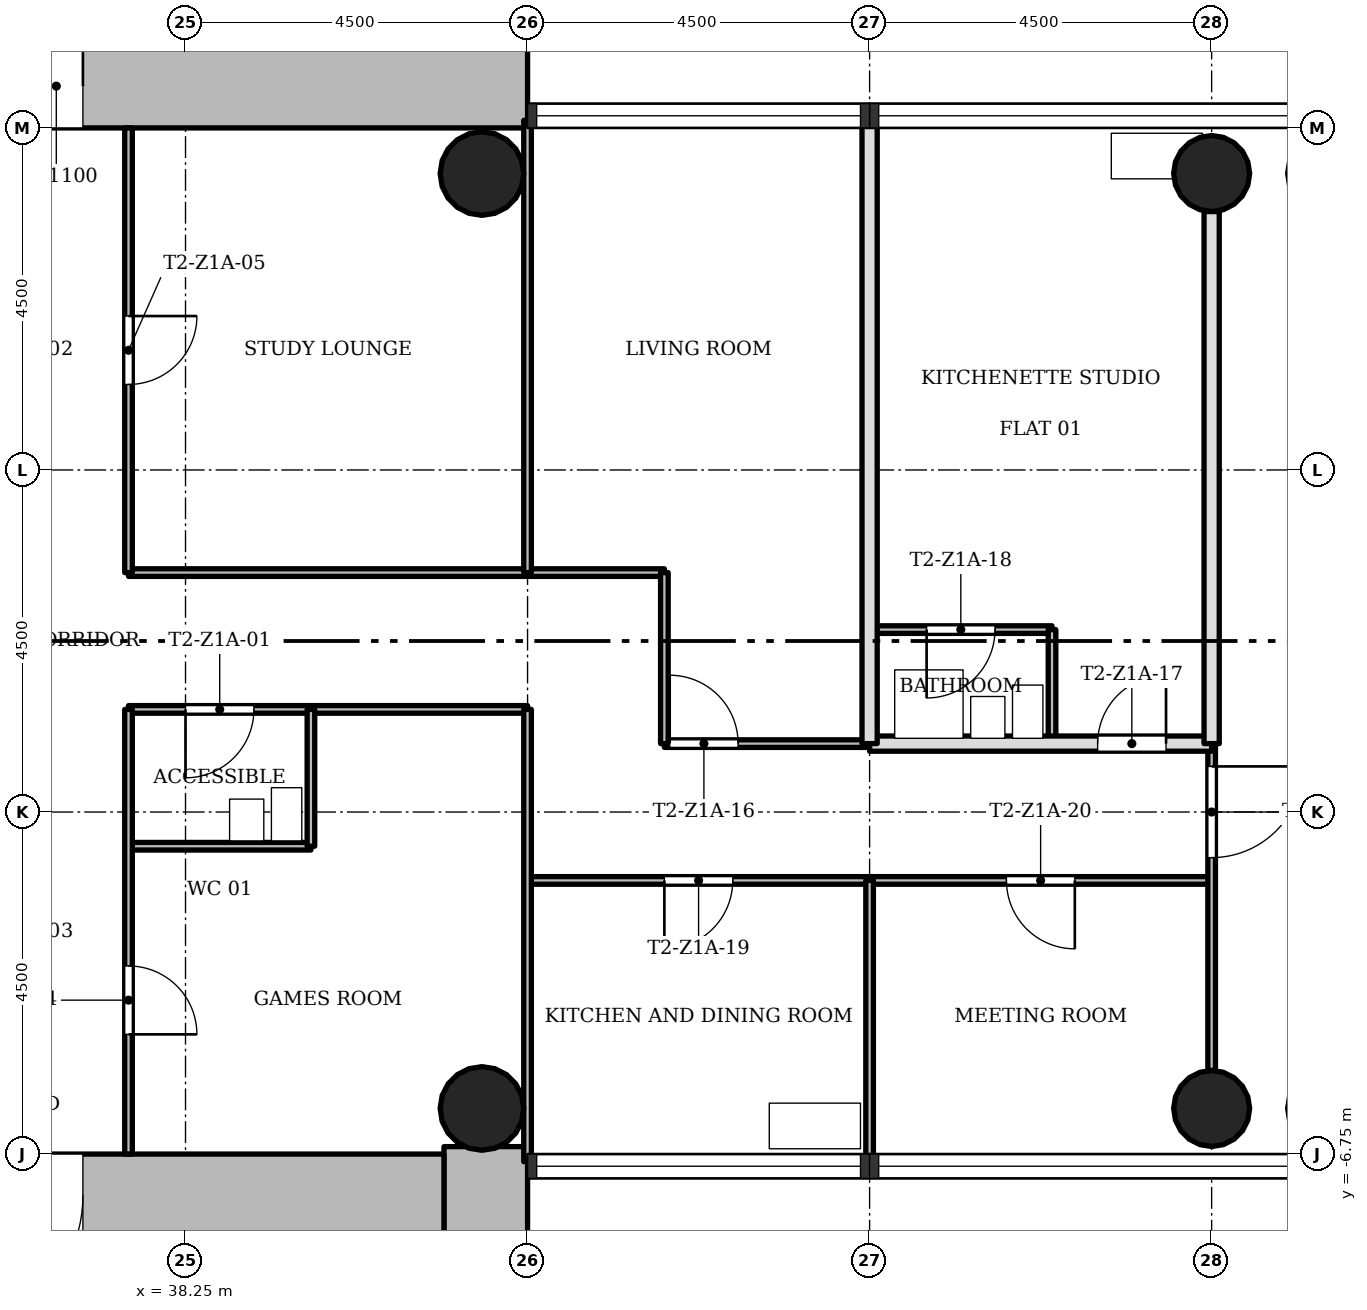
"""IFC4 building model, lengths in metres.
Left out: names, types, materials, properties, quantities, classifications, styles, units other than length and angle.
Written with IfcOpenShell. Run it as: python <this file> out.ifc"""

import sys

from ifc_helpers import new_model, si_unit, direction, frame, frame_2d, origin, origin_2d, place, context, subcontext, project, spatial, rectangle, hollow_circle, extrude, element, fill, save


model = new_model("IFC4")
c1 = context("Model", 3, precision=1e-05, world=origin(), true_north=direction((0.0, 1.0)))
c2 = subcontext(c1, "Body", "Model", "MODEL_VIEW")
j1 = project(units=[si_unit("LENGTHUNIT", "METRE"), si_unit("PLANEANGLEUNIT", "RADIAN")], contexts=[c1])
p1 = place(None, origin())
s1 = spatial("IfcSite", under=j1, at=p1, CompositionType="ELEMENT")
p2 = place(p1, origin())
s2 = spatial("IfcBuilding", under=s1, at=p2, CompositionType="ELEMENT")
p3 = place(p2, frame((0.0, 0.0, 24.5)))
s3 = spatial("IfcBuildingStorey", under=s2, at=p3, CompositionType="ELEMENT", Elevation=24.5)
p4 = place(p3, frame((30.35, 7.3, 0.0), z_axis=(0.0, 0.0, 1.0), x_axis=(1.0, 0.0, 0.0)))
e1 = element("IfcWall", 1, at=p4, inside=s3, PredefinedType="SHEAR", context=c2, shape_type="SweptSolid", body=[
    extrude(rectangle(XDim=12.4, YDim=1.1, at=frame_2d((6.2, 0.0))), origin(), (0.0, 0.0, 1.0), 3.4),
])
p5 = place(p4, frame((4.75, 0.0, 0.0)))
e2 = element("IfcOpeningElement", 2, at=p5, cuts=e1, PredefinedType="OPENING", context=c2, shape_type="SweptSolid", body=[
    extrude(rectangle(XDim=1.8, YDim=2.1, at=frame_2d((0.9, 1.05))), frame((0.0, 0.56, 0.0), z_axis=(0.0, -1.0, 0.0), x_axis=(1.0, 0.0, 0.0)), (0.0, 0.0, 1.0), 1.12),
])
p6 = place(p3, frame((42.2, -15.248, 0.0), z_axis=(0.0, 0.0, 1.0), x_axis=(0.0, 1.0, 0.0)))
e3 = element("IfcWall", 3, at=p6, inside=s3, PredefinedType="SHEAR", context=c2, shape_type="SweptSolid", body=[
    extrude(rectangle(XDim=8.596, YDim=1.1, at=frame_2d((4.298, 0.0))), origin(), (0.0, 0.0, 1.0), 3.4),
])
p7 = place(p3, frame((41.65, -7.3, 0.0), z_axis=(0.0, 0.0, 1.0), x_axis=(-1.0, 0.0, 0.0)))
e4 = element("IfcWall", 4, at=p7, inside=s3, PredefinedType="SHEAR", context=c2, shape_type="SweptSolid", body=[
    extrude(rectangle(XDim=12.4, YDim=1.1, at=frame_2d((6.2, 0.0))), origin(), (0.0, 0.0, 1.0), 3.4),
])
p8 = place(p7, frame((4.75, 0.0, 0.0)))
e5 = element("IfcOpeningElement", 5, at=p8, cuts=e4, PredefinedType="OPENING", context=c2, shape_type="SweptSolid", body=[
    extrude(rectangle(XDim=1.8, YDim=2.1, at=frame_2d((0.9, 1.05))), frame((0.0, 0.56, 0.0), z_axis=(0.0, -1.0, 0.0), x_axis=(1.0, 0.0, 0.0)), (0.0, 0.0, 1.0), 1.12),
])
for number, where, z_axis, x_axis in (
    (6, (51.75, -6.15, 0.0), (0.0, 0.0, 1.0), (1.0, 0.0, 0.0)),
    (7, (51.75, 6.15, 0.0), (0.0, 0.0, 1.0), (1.0, 0.0, 0.0)),
):
    element("IfcColumn", number, at=place(p3, frame(where, z_axis=z_axis, x_axis=x_axis)), inside=s3, PredefinedType="COLUMN", context=c2, shape_type="SweptSolid", body=[
        extrude(hollow_circle(Radius=0.5, WallThickness=0.036, at=origin_2d()), origin(), (0.0, 0.0, 1.0), 3.4),
    ])
for number, where, z_axis, x_axis in (
    (8, (42.15, -6.15, 0.0), (0.0, 0.0, 1.0), (1.0, 0.0, 0.0)),
    (9, (42.15, 6.15, 0.0), (0.0, 0.0, 1.0), (1.0, 0.0, 0.0)),
):
    element("IfcColumn", number, at=place(p3, frame(where, z_axis=z_axis, x_axis=x_axis)), inside=s3, PredefinedType="COLUMN", context=c2, shape_type="SweptSolid", body=[
        extrude(hollow_circle(Radius=0.55, WallThickness=0.04, at=origin_2d()), origin(), (0.0, 0.0, 1.0), 3.4),
    ])
p9 = place(p3, frame((51.75, -3.15, 0.0), z_axis=(0.0, 0.0, 1.0), x_axis=(-1.0, 0.0, 0.0)))
e10 = element("IfcWall", 10, at=p9, inside=s3, PredefinedType="PARTITIONING", context=c2, shape_type="SweptSolid", body=[
    extrude(rectangle(XDim=9.0, YDim=0.1, at=frame_2d((4.5, 0.0))), origin(), (0.0, 0.0, 1.0), 3.0),
])
p10 = place(p9, frame((6.3, 0.0, 0.0)))
e11 = element("IfcOpeningElement", 11, at=p10, cuts=e10, PredefinedType="OPENING", context=c2, shape_type="SweptSolid", body=[
    extrude(rectangle(XDim=0.9, YDim=2.1, at=frame_2d((0.45, 1.05))), frame((0.0, 0.06, 0.0), z_axis=(0.0, -1.0, 0.0), x_axis=(1.0, 0.0, 0.0)), (0.0, 0.0, 1.0), 0.12),
])
p11 = place(p9, frame((1.8, 0.0, 0.0)))
e12 = element("IfcOpeningElement", 12, at=p11, cuts=e10, PredefinedType="OPENING", context=c2, shape_type="SweptSolid", body=[
    extrude(rectangle(XDim=0.9, YDim=2.1, at=frame_2d((0.45, 1.05))), frame((0.0, 0.06, 0.0), z_axis=(0.0, -1.0, 0.0), x_axis=(1.0, 0.0, 0.0)), (0.0, 0.0, 1.0), 0.12),
])
p12 = place(p3, frame((39.9, -2.7, 0.0), z_axis=(0.0, 0.0, 1.0), x_axis=(-1.0, 0.0, 0.0)))
e13 = element("IfcWall", 13, at=p12, inside=s3, PredefinedType="PARTITIONING", context=c2, shape_type="SweptSolid", body=[
    extrude(rectangle(XDim=2.4, YDim=0.1, at=frame_2d((1.2, 0.0))), origin(), (0.0, 0.0, 1.0), 3.0),
])
p13 = place(p3, frame((47.25, -1.35, 0.0), z_axis=(0.0, 0.0, 1.0), x_axis=(-1.0, 0.0, 0.0)))
e14 = element("IfcWall", 14, at=p13, inside=s3, PredefinedType="PARTITIONING", context=c2, shape_type="SweptSolid", body=[
    extrude(rectangle(XDim=2.7, YDim=0.1, at=frame_2d((1.35, 0.0))), origin(), (0.0, 0.0, 1.0), 3.0),
])
p14 = place(p13, frame((1.73, 0.0, 0.0)))
e15 = element("IfcOpeningElement", 15, at=p14, cuts=e14, PredefinedType="OPENING", context=c2, shape_type="SweptSolid", body=[
    extrude(rectangle(XDim=0.9, YDim=2.1, at=frame_2d((0.45, 1.05))), frame((0.0, 0.06, 0.0), z_axis=(0.0, -1.0, 0.0), x_axis=(1.0, 0.0, 0.0)), (0.0, 0.0, 1.0), 0.12),
])
p15 = place(p3, frame((51.75, -1.35, 0.0), z_axis=(0.0, 0.0, 1.0), x_axis=(-1.0, 0.0, 0.0)))
e16 = element("IfcWall", 16, at=p15, inside=s3, PredefinedType="SOLIDWALL", context=c2, shape_type="SweptSolid", body=[
    extrude(rectangle(XDim=4.5, YDim=0.2, at=frame_2d((2.25, 0.0))), origin(), (0.0, 0.0, 1.0), 3.0),
])
p16 = place(p15, frame((0.6, 0.0, 0.0)))
e17 = element("IfcOpeningElement", 17, at=p16, cuts=e16, PredefinedType="OPENING", context=c2, shape_type="SweptSolid", body=[
    extrude(rectangle(XDim=0.9, YDim=2.1, at=frame_2d((0.45, 1.05))), frame((0.0, 0.11, 0.0), z_axis=(0.0, -1.0, 0.0), x_axis=(1.0, 0.0, 0.0)), (0.0, 0.0, 1.0), 0.22),
])
p17 = place(p3, frame((42.75, -0.9, 0.0), z_axis=(0.0, 0.0, 1.0), x_axis=(-1.0, 0.0, 0.0)))
e18 = element("IfcWall", 18, at=p17, inside=s3, PredefinedType="PARTITIONING", context=c2, shape_type="SweptSolid", body=[
    extrude(rectangle(XDim=5.25, YDim=0.1, at=frame_2d((2.625, 0.0))), origin(), (0.0, 0.0, 1.0), 3.0),
])
p18 = place(p17, frame((3.6, 0.0, 0.0)))
e19 = element("IfcOpeningElement", 19, at=p18, cuts=e18, PredefinedType="OPENING", context=c2, shape_type="SweptSolid", body=[
    extrude(rectangle(XDim=0.9, YDim=2.1, at=frame_2d((0.45, 1.05))), frame((0.0, 0.06, 0.0), z_axis=(0.0, -1.0, 0.0), x_axis=(1.0, 0.0, 0.0)), (0.0, 0.0, 1.0), 0.12),
])
p19 = place(p3, frame((49.65, 0.15, 0.0), z_axis=(0.0, 0.0, 1.0), x_axis=(-1.0, 0.0, 0.0)))
e20 = element("IfcWall", 20, at=p19, inside=s3, PredefinedType="PARTITIONING", context=c2, shape_type="SweptSolid", body=[
    extrude(rectangle(XDim=2.4, YDim=0.1, at=frame_2d((1.2, 0.0))), origin(), (0.0, 0.0, 1.0), 3.0),
])
p20 = place(p19, frame((0.75, 0.0, 0.0)))
e21 = element("IfcOpeningElement", 21, at=p20, cuts=e20, PredefinedType="OPENING", context=c2, shape_type="SweptSolid", body=[
    extrude(rectangle(XDim=0.9, YDim=2.1, at=frame_2d((0.45, 1.05))), frame((0.0, 0.06, 0.0), z_axis=(0.0, -1.0, 0.0), x_axis=(1.0, 0.0, 0.0)), (0.0, 0.0, 1.0), 0.12),
])
p21 = place(p3, frame((44.55, 0.9, 0.0), z_axis=(0.0, 0.0, 1.0), x_axis=(-1.0, 0.0, 0.0)))
e22 = element("IfcWall", 22, at=p21, inside=s3, PredefinedType="PARTITIONING", context=c2, shape_type="SweptSolid", body=[
    extrude(rectangle(XDim=7.05, YDim=0.1, at=frame_2d((3.525, 0.0))), origin(), (0.0, 0.0, 1.0), 3.0),
])
p22 = place(p3, frame((51.75, -5.65, 0.0), z_axis=(0.0, 0.0, 1.0), x_axis=(0.0, 1.0, 0.0)))
e23 = element("IfcWall", 23, at=p22, inside=s3, PredefinedType="PARTITIONING", context=c2, shape_type="SweptSolid", body=[
    extrude(rectangle(XDim=4.3, YDim=0.1, at=frame_2d((2.15, 0.0))), origin(), (0.0, 0.0, 1.0), 3.0),
])
p23 = place(p22, frame((2.8, 0.0, 0.0)))
e24 = element("IfcOpeningElement", 24, at=p23, cuts=e23, PredefinedType="OPENING", context=c2, shape_type="SweptSolid", body=[
    extrude(rectangle(XDim=1.2, YDim=2.1, at=frame_2d((0.6, 1.05))), frame((0.0, 0.06, 0.0), z_axis=(0.0, -1.0, 0.0), x_axis=(1.0, 0.0, 0.0)), (0.0, 0.0, 1.0), 0.12),
])
p24 = place(p3, frame((51.75, -1.35, 0.0), z_axis=(0.0, 0.0, 1.0), x_axis=(0.0, 1.0, 0.0)))
e25 = element("IfcWall", 25, at=p24, inside=s3, PredefinedType="SOLIDWALL", context=c2, shape_type="SweptSolid", body=[
    extrude(rectangle(XDim=7.0, YDim=0.2, at=frame_2d((3.5, 0.0))), origin(), (0.0, 0.0, 1.0), 3.0),
])
p25 = place(p3, frame((49.65, -1.35, 0.0), z_axis=(0.0, 0.0, 1.0), x_axis=(0.0, 1.0, 0.0)))
e26 = element("IfcWall", 26, at=p25, inside=s3, PredefinedType="PARTITIONING", context=c2, shape_type="SweptSolid", body=[
    extrude(rectangle(XDim=1.5, YDim=0.1, at=frame_2d((0.75, 0.0))), origin(), (0.0, 0.0, 1.0), 3.0),
])
p26 = place(p3, frame((47.25, -6.85, 0.0), z_axis=(0.0, 0.0, 1.0), x_axis=(0.0, 1.0, 0.0)))
e27 = element("IfcWall", 27, at=p26, inside=s3, PredefinedType="PARTITIONING", context=c2, shape_type="SweptSolid", body=[
    extrude(rectangle(XDim=3.7, YDim=0.1, at=frame_2d((1.85, 0.0))), origin(), (0.0, 0.0, 1.0), 3.0),
])
p27 = place(p3, frame((47.25, -1.35, 0.0), z_axis=(0.0, 0.0, 1.0), x_axis=(0.0, 1.0, 0.0)))
e28 = element("IfcWall", 28, at=p27, inside=s3, PredefinedType="SOLIDWALL", context=c2, shape_type="SweptSolid", body=[
    extrude(rectangle(XDim=8.2, YDim=0.2, at=frame_2d((4.1, 0.0))), origin(), (0.0, 0.0, 1.0), 3.0),
])
p28 = place(p3, frame((44.55, -1.35, 0.0), z_axis=(0.0, 0.0, 1.0), x_axis=(0.0, 1.0, 0.0)))
e29 = element("IfcWall", 29, at=p28, inside=s3, PredefinedType="PARTITIONING", context=c2, shape_type="SweptSolid", body=[
    extrude(rectangle(XDim=2.25, YDim=0.1, at=frame_2d((1.125, 0.0))), origin(), (0.0, 0.0, 1.0), 3.0),
])
for number, where, z_axis, x_axis in (
    (30, (42.75, -6.85, 0.0), (0.0, 0.0, 1.0), (0.0, 1.0, 0.0)),
    (31, (42.75, 0.9, 0.0), (0.0, 0.0, 1.0), (0.0, 1.0, 0.0)),
):
    element("IfcWall", number, at=place(p3, frame(where, z_axis=z_axis, x_axis=x_axis)), inside=s3, PredefinedType="PARTITIONING", context=c2, shape_type="SweptSolid", body=[
        extrude(rectangle(XDim=5.95, YDim=0.1, at=frame_2d((2.975, 0.0))), origin(), (0.0, 0.0, 1.0), 3.0),
    ])
p29 = place(p3, frame((39.9, -2.7, 0.0), z_axis=(0.0, 0.0, 1.0), x_axis=(0.0, 1.0, 0.0)))
e32 = element("IfcWall", 32, at=p29, inside=s3, PredefinedType="PARTITIONING", context=c2, shape_type="SweptSolid", body=[
    extrude(rectangle(XDim=1.8, YDim=0.1, at=frame_2d((0.9, 0.0))), origin(), (0.0, 0.0, 1.0), 3.0),
])
p30 = place(p3, frame((37.5, -6.75, 0.0), z_axis=(0.0, 0.0, 1.0), x_axis=(0.0, 1.0, 0.0)))
e33 = element("IfcWall", 33, at=p30, inside=s3, PredefinedType="PARTITIONING", context=c2, shape_type="SweptSolid", body=[
    extrude(rectangle(XDim=5.85, YDim=0.1, at=frame_2d((2.925, 0.0))), origin(), (0.0, 0.0, 1.0), 3.0),
])
p31 = place(p30, frame((1.575, 0.0, 0.0)))
e34 = element("IfcOpeningElement", 34, at=p31, cuts=e33, PredefinedType="OPENING", context=c2, shape_type="SweptSolid", body=[
    extrude(rectangle(XDim=0.9, YDim=2.1, at=frame_2d((0.45, 1.05))), frame((0.0, 0.06, 0.0), z_axis=(0.0, -1.0, 0.0), x_axis=(1.0, 0.0, 0.0)), (0.0, 0.0, 1.0), 0.12),
])
p32 = place(p3, frame((37.5, 0.9, 0.0), z_axis=(0.0, 0.0, 1.0), x_axis=(0.0, 1.0, 0.0)))
e35 = element("IfcWall", 35, at=p32, inside=s3, PredefinedType="PARTITIONING", context=c2, shape_type="SweptSolid", body=[
    extrude(rectangle(XDim=5.85, YDim=0.1, at=frame_2d((2.925, 0.0))), origin(), (0.0, 0.0, 1.0), 3.0),
])
p33 = place(p32, frame((2.475, 0.0, 0.0)))
e36 = element("IfcOpeningElement", 36, at=p33, cuts=e35, PredefinedType="OPENING", context=c2, shape_type="SweptSolid", body=[
    extrude(rectangle(XDim=0.9, YDim=2.1, at=frame_2d((0.45, 1.05))), frame((0.0, 0.06, 0.0), z_axis=(0.0, -1.0, 0.0), x_axis=(1.0, 0.0, 0.0)), (0.0, 0.0, 1.0), 0.12),
])
p34 = place(p18, origin())
e37 = element("IfcDoor", 37, at=p34, inside=s3, OperationType="SINGLE_SWING_LEFT", PredefinedType="DOOR", context=c2, shape_type="SweptSolid", body=[
    extrude(rectangle(XDim=0.9, YDim=2.1, at=frame_2d((0.45, 1.05))), frame((0.0, 0.025, 0.0), z_axis=(0.0, -1.0, 0.0), x_axis=(1.0, 0.0, 0.0)), (0.0, 0.0, 1.0), 0.05),
])
fill(e19, e37)
p35 = place(p31, origin())
e38 = element("IfcDoor", 38, at=p35, inside=s3, OperationType="SINGLE_SWING_LEFT", PredefinedType="DOOR", context=c2, shape_type="SweptSolid", body=[
    extrude(rectangle(XDim=0.9, YDim=2.1, at=frame_2d((0.45, 1.05))), frame((0.0, 0.025, 0.0), z_axis=(0.0, -1.0, 0.0), x_axis=(1.0, 0.0, 0.0)), (0.0, 0.0, 1.0), 0.05),
])
fill(e34, e38)
p36 = place(p33, origin())
e39 = element("IfcDoor", 39, at=p36, inside=s3, OperationType="SINGLE_SWING_RIGHT", PredefinedType="DOOR", context=c2, shape_type="SweptSolid", body=[
    extrude(rectangle(XDim=0.9, YDim=2.1, at=frame_2d((0.45, 1.05))), frame((0.0, 0.025, 0.0), z_axis=(0.0, -1.0, 0.0), x_axis=(1.0, 0.0, 0.0)), (0.0, 0.0, 1.0), 0.05),
])
fill(e36, e39)
p37 = place(p14, origin())
e40 = element("IfcDoor", 40, at=p37, inside=s3, OperationType="SINGLE_SWING_RIGHT", PredefinedType="DOOR", context=c2, shape_type="SweptSolid", body=[
    extrude(rectangle(XDim=0.9, YDim=2.1, at=frame_2d((0.45, 1.05))), frame((0.0, 0.025, 0.0), z_axis=(0.0, -1.0, 0.0), x_axis=(1.0, 0.0, 0.0)), (0.0, 0.0, 1.0), 0.05),
])
fill(e15, e40)
p38 = place(p16, origin())
e41 = element("IfcDoor", 41, at=p38, inside=s3, OperationType="SINGLE_SWING_LEFT", PredefinedType="DOOR", context=c2, shape_type="SweptSolid", body=[
    extrude(rectangle(XDim=0.9, YDim=2.1, at=frame_2d((0.45, 1.05))), frame((0.0, 0.025, 0.0), z_axis=(0.0, -1.0, 0.0), x_axis=(1.0, 0.0, 0.0)), (0.0, 0.0, 1.0), 0.05),
])
fill(e17, e41)
p39 = place(p20, origin())
e42 = element("IfcDoor", 42, at=p39, inside=s3, OperationType="SINGLE_SWING_LEFT", PredefinedType="DOOR", context=c2, shape_type="SweptSolid", body=[
    extrude(rectangle(XDim=0.9, YDim=2.1, at=frame_2d((0.45, 1.05))), frame((0.0, 0.025, 0.0), z_axis=(0.0, -1.0, 0.0), x_axis=(1.0, 0.0, 0.0)), (0.0, 0.0, 1.0), 0.05),
])
fill(e21, e42)
p40 = place(p10, origin())
e43 = element("IfcDoor", 43, at=p40, inside=s3, OperationType="SINGLE_SWING_LEFT", PredefinedType="DOOR", context=c2, shape_type="SweptSolid", body=[
    extrude(rectangle(XDim=0.9, YDim=2.1, at=frame_2d((0.45, 1.05))), frame((0.0, 0.025, 0.0), z_axis=(0.0, -1.0, 0.0), x_axis=(1.0, 0.0, 0.0)), (0.0, 0.0, 1.0), 0.05),
])
fill(e11, e43)
p41 = place(p11, origin())
e44 = element("IfcDoor", 44, at=p41, inside=s3, OperationType="SINGLE_SWING_RIGHT", PredefinedType="DOOR", context=c2, shape_type="SweptSolid", body=[
    extrude(rectangle(XDim=0.9, YDim=2.1, at=frame_2d((0.45, 1.05))), frame((0.0, 0.025, 0.0), z_axis=(0.0, -1.0, 0.0), x_axis=(1.0, 0.0, 0.0)), (0.0, 0.0, 1.0), 0.05),
])
fill(e12, e44)
p42 = place(p23, origin())
e45 = element("IfcDoor", 45, at=p42, inside=s3, OperationType="SINGLE_SWING_RIGHT", PredefinedType="DOOR", context=c2, shape_type="SweptSolid", body=[
    extrude(rectangle(XDim=1.2, YDim=2.1, at=frame_2d((0.6, 1.05))), frame((0.0, 0.025, 0.0), z_axis=(0.0, -1.0, 0.0), x_axis=(1.0, 0.0, 0.0)), (0.0, 0.0, 1.0), 0.05),
])
fill(e24, e45)
p43 = place(p5, origin())
e46 = element("IfcDoor", 46, at=p43, inside=s3, OperationType="SINGLE_SWING_LEFT", PredefinedType="DOOR", context=c2, shape_type="SweptSolid", body=[
    extrude(rectangle(XDim=1.8, YDim=2.1, at=frame_2d((0.9, 1.05))), frame((0.0, 0.025, 0.0), z_axis=(0.0, -1.0, 0.0), x_axis=(1.0, 0.0, 0.0)), (0.0, 0.0, 1.0), 0.05),
])
fill(e2, e46)
p44 = place(p8, origin())
e47 = element("IfcDoor", 47, at=p44, inside=s3, OperationType="SINGLE_SWING_LEFT", PredefinedType="DOOR", context=c2, shape_type="SweptSolid", body=[
    extrude(rectangle(XDim=1.8, YDim=2.1, at=frame_2d((0.9, 1.05))), frame((0.0, 0.025, 0.0), z_axis=(0.0, -1.0, 0.0), x_axis=(1.0, 0.0, 0.0)), (0.0, 0.0, 1.0), 0.05),
])
fill(e5, e47)
save(model, sys.argv[1])
